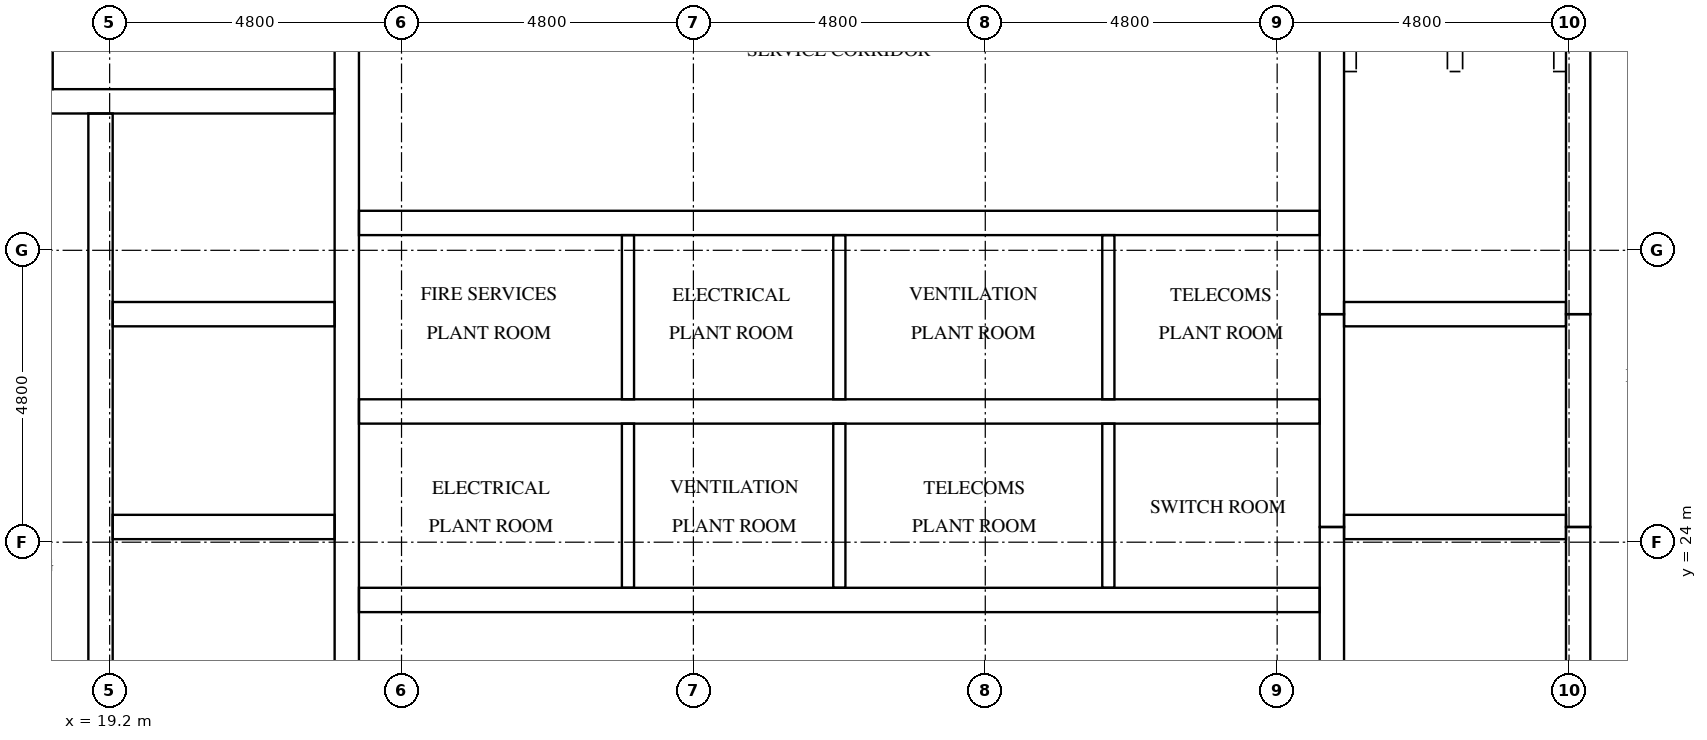
"""IFC4 building model, lengths in metres.
Left out: names, types, materials, properties, quantities, classifications, styles, units other than length and angle.
Written with IfcOpenShell. Run it as: python <this file> out.ifc"""

import sys

from ifc_helpers import new_model, si_unit, direction, frame, frame_2d, origin, place, context, subcontext, project, spatial, rectangle, extrude, element, fill, save


model = new_model("IFC4")
c1 = context("Model", 3, precision=1e-05, world=origin(), true_north=direction((0.0, 1.0)))
c2 = subcontext(c1, "Body", "Model", "MODEL_VIEW")
j1 = project(units=[si_unit("LENGTHUNIT", "METRE"), si_unit("PLANEANGLEUNIT", "RADIAN")], contexts=[c1])
p1 = place(None, origin())
s1 = spatial("IfcSite", under=j1, at=p1, CompositionType="ELEMENT")
p2 = place(p1, origin())
s2 = spatial("IfcBuilding", under=s1, at=p2, CompositionType="ELEMENT")
p3 = place(p2, frame((0.0, 0.0, 310.1)))
s3 = spatial("IfcBuildingStorey", under=s2, at=p3, CompositionType="ELEMENT", Elevation=310.1)
p4 = place(p3, frame((19.05, 15.5, 0.0), z_axis=(0.0, 0.0, 1.0), x_axis=(0.0, 1.0, 0.0)))
e1 = element("IfcWall", 1, at=p4, inside=s3, PredefinedType="SHEAR", context=c2, shape_type="SweptSolid", body=[
    extrude(rectangle(XDim=15.55, YDim=0.4, at=frame_2d((7.775, 0.0))), origin(), (0.0, 0.0, 1.0), 3.8),
])
p5 = place(p4, frame((9.95, 0.0, 0.0)))
e2 = element("IfcOpeningElement", 2, at=p5, cuts=e1, PredefinedType="OPENING", context=c2, shape_type="SweptSolid", body=[
    extrude(rectangle(XDim=1.1, YDim=2.1, at=frame_2d((0.55, 1.05))), frame((0.0, 0.21, 0.0), z_axis=(0.0, -1.0, 0.0), x_axis=(1.0, 0.0, 0.0)), (0.0, 0.0, 1.0), 0.42),
])
p6 = place(p4, frame((13.45, 0.0, 0.0)))
e3 = element("IfcOpeningElement", 3, at=p6, cuts=e1, PredefinedType="OPENING", context=c2, shape_type="SweptSolid", body=[
    extrude(rectangle(XDim=1.1, YDim=2.1, at=frame_2d((0.55, 1.05))), frame((0.0, 0.21, 0.0), z_axis=(0.0, -1.0, 0.0), x_axis=(1.0, 0.0, 0.0)), (0.0, 0.0, 1.0), 0.42),
])
p7 = place(p4, frame((0.7, 0.0, 0.0)))
e4 = element("IfcOpeningElement", 4, at=p7, cuts=e1, PredefinedType="OPENING", context=c2, shape_type="SweptSolid", body=[
    extrude(rectangle(XDim=1.2, YDim=2.1, at=frame_2d((0.6, 1.05))), frame((0.0, 0.21, 0.0), z_axis=(0.0, -1.0, 0.0), x_axis=(1.0, 0.0, 0.0)), (0.0, 0.0, 1.0), 0.42),
])
p8 = place(p3, frame((23.1, 15.5, 0.0), z_axis=(0.0, 0.0, 1.0), x_axis=(0.0, 1.0, 0.0)))
e5 = element("IfcWall", 5, at=p8, inside=s3, PredefinedType="SHEAR", context=c2, shape_type="SweptSolid", body=[
    extrude(rectangle(XDim=21.8, YDim=0.4, at=frame_2d((10.9, 0.0))), origin(), (0.0, 0.0, 1.0), 3.8),
])
p9 = place(p3, frame((39.3, 15.5, 0.0), z_axis=(0.0, 0.0, 1.0), x_axis=(0.0, 1.0, 0.0)))
e6 = element("IfcWall", 6, at=p9, inside=s3, PredefinedType="SHEAR", context=c2, shape_type="SweptSolid", body=[
    extrude(rectangle(XDim=8.75, YDim=0.4, at=frame_2d((4.375, 0.0))), origin(), (0.0, 0.0, 1.0), 3.8),
])
p10 = place(p3, frame((39.3, 24.25, 0.0), z_axis=(0.0, 0.0, 1.0), x_axis=(0.0, 1.0, 0.0)))
e7 = element("IfcWall", 7, at=p10, inside=s3, PredefinedType="SHEAR", context=c2, shape_type="SweptSolid", body=[
    extrude(rectangle(XDim=3.5, YDim=0.4, at=frame_2d((1.75, 0.0))), origin(), (0.0, 0.0, 1.0), 3.8),
])
p11 = place(p3, frame((39.3, 27.75, 0.0), z_axis=(0.0, 0.0, 1.0), x_axis=(0.0, 1.0, 0.0)))
e8 = element("IfcWall", 8, at=p11, inside=s3, PredefinedType="SHEAR", context=c2, shape_type="SweptSolid", body=[
    extrude(rectangle(XDim=9.55, YDim=0.4, at=frame_2d((4.775, 0.0))), origin(), (0.0, 0.0, 1.0), 3.8),
])
p12 = place(p3, frame((43.35, 15.5, 0.0), z_axis=(0.0, 0.0, 1.0), x_axis=(0.0, 1.0, 0.0)))
e9 = element("IfcWall", 9, at=p12, inside=s3, PredefinedType="SHEAR", context=c2, shape_type="SweptSolid", body=[
    extrude(rectangle(XDim=8.75, YDim=0.4, at=frame_2d((4.375, 0.0))), origin(), (0.0, 0.0, 1.0), 3.8),
])
p13 = place(p12, frame((0.7, 0.0, 0.0)))
e10 = element("IfcOpeningElement", 10, at=p13, cuts=e9, PredefinedType="OPENING", context=c2, shape_type="SweptSolid", body=[
    extrude(rectangle(XDim=1.2, YDim=2.1, at=frame_2d((0.6, 1.05))), frame((0.0, 0.21, 0.0), z_axis=(0.0, -1.0, 0.0), x_axis=(1.0, 0.0, 0.0)), (0.0, 0.0, 1.0), 0.42),
])
p14 = place(p3, frame((43.35, 24.25, 0.0), z_axis=(0.0, 0.0, 1.0), x_axis=(0.0, 1.0, 0.0)))
e11 = element("IfcWall", 11, at=p14, inside=s3, PredefinedType="SHEAR", context=c2, shape_type="SweptSolid", body=[
    extrude(rectangle(XDim=3.5, YDim=0.4, at=frame_2d((1.75, 0.0))), origin(), (0.0, 0.0, 1.0), 3.8),
])
p15 = place(p14, frame((1.2, 0.0, 0.0)))
e12 = element("IfcOpeningElement", 12, at=p15, cuts=e11, PredefinedType="OPENING", context=c2, shape_type="SweptSolid", body=[
    extrude(rectangle(XDim=1.1, YDim=2.1, at=frame_2d((0.55, 1.05))), frame((0.0, 0.21, 0.0), z_axis=(0.0, -1.0, 0.0), x_axis=(1.0, 0.0, 0.0)), (0.0, 0.0, 1.0), 0.42),
])
p16 = place(p3, frame((43.35, 27.75, 0.0), z_axis=(0.0, 0.0, 1.0), x_axis=(0.0, 1.0, 0.0)))
e13 = element("IfcWall", 13, at=p16, inside=s3, PredefinedType="SHEAR", context=c2, shape_type="SweptSolid", body=[
    extrude(rectangle(XDim=9.55, YDim=0.4, at=frame_2d((4.775, 0.0))), origin(), (0.0, 0.0, 1.0), 3.8),
])
p17 = place(p16, frame((7.65, 0.0, 0.0)))
e14 = element("IfcOpeningElement", 14, at=p17, cuts=e13, PredefinedType="OPENING", context=c2, shape_type="SweptSolid", body=[
    extrude(rectangle(XDim=1.2, YDim=2.1, at=frame_2d((0.6, 1.05))), frame((0.0, 0.21, 0.0), z_axis=(0.0, -1.0, 0.0), x_axis=(1.0, 0.0, 0.0)), (0.0, 0.0, 1.0), 0.42),
])
for number, where, z_axis, x_axis in (
    (15, (19.25, 24.25, 0.0), (0.0, 0.0, 1.0), (1.0, 0.0, 0.0)),
    (16, (19.25, 27.75, 0.0), (0.0, 0.0, 1.0), (1.0, 0.0, 0.0)),
):
    element("IfcWall", number, at=place(p3, frame(where, z_axis=z_axis, x_axis=x_axis)), inside=s3, PredefinedType="SHEAR", context=c2, shape_type="SweptSolid", body=[
        extrude(rectangle(XDim=3.65, YDim=0.4, at=frame_2d((1.825, 0.0))), origin(), (0.0, 0.0, 1.0), 3.8),
    ])
p18 = place(p3, frame((15.5, 31.25, 0.0), z_axis=(0.0, 0.0, 1.0), x_axis=(1.0, 0.0, 0.0)))
e17 = element("IfcWall", 17, at=p18, inside=s3, PredefinedType="SHEAR", context=c2, shape_type="SweptSolid", body=[
    extrude(rectangle(XDim=7.4, YDim=0.4, at=frame_2d((3.7, 0.0))), origin(), (0.0, 0.0, 1.0), 3.8),
])
for number, where, z_axis, x_axis in (
    (18, (39.5, 24.25, 0.0), (0.0, 0.0, 1.0), (1.0, 0.0, 0.0)),
    (19, (39.5, 27.75, 0.0), (0.0, 0.0, 1.0), (1.0, 0.0, 0.0)),
):
    element("IfcWall", number, at=place(p3, frame(where, z_axis=z_axis, x_axis=x_axis)), inside=s3, PredefinedType="SHEAR", context=c2, shape_type="SweptSolid", body=[
        extrude(rectangle(XDim=3.65, YDim=0.4, at=frame_2d((1.825, 0.0))), origin(), (0.0, 0.0, 1.0), 3.8),
    ])
p19 = place(p3, frame((23.3, 23.05, 0.0), z_axis=(0.0, 0.0, 1.0), x_axis=(1.0, 0.0, 0.0)))
e20 = element("IfcWall", 20, at=p19, inside=s3, PredefinedType="SHEAR", context=c2, shape_type="SweptSolid", body=[
    extrude(rectangle(XDim=15.8, YDim=0.4, at=frame_2d((7.9, 0.0))), origin(), (0.0, 0.0, 1.0), 3.8),
])
p20 = place(p19, frame((1.662, 0.0, 0.0)))
e21 = element("IfcOpeningElement", 21, at=p20, cuts=e20, PredefinedType="OPENING", context=c2, shape_type="SweptSolid", body=[
    extrude(rectangle(XDim=1.0, YDim=2.1, at=frame_2d((0.5, 1.05))), frame((0.0, 0.21, 0.0), z_axis=(0.0, -1.0, 0.0), x_axis=(1.0, 0.0, 0.0)), (0.0, 0.0, 1.0), 0.42),
])
p21 = place(p19, frame((5.662, 0.0, 0.0)))
e22 = element("IfcOpeningElement", 22, at=p21, cuts=e20, PredefinedType="OPENING", context=c2, shape_type="SweptSolid", body=[
    extrude(rectangle(XDim=1.0, YDim=2.1, at=frame_2d((0.5, 1.05))), frame((0.0, 0.21, 0.0), z_axis=(0.0, -1.0, 0.0), x_axis=(1.0, 0.0, 0.0)), (0.0, 0.0, 1.0), 0.42),
])
p22 = place(p19, frame((9.612, 0.0, 0.0)))
e23 = element("IfcOpeningElement", 23, at=p22, cuts=e20, PredefinedType="OPENING", context=c2, shape_type="SweptSolid", body=[
    extrude(rectangle(XDim=1.0, YDim=2.1, at=frame_2d((0.5, 1.05))), frame((0.0, 0.21, 0.0), z_axis=(0.0, -1.0, 0.0), x_axis=(1.0, 0.0, 0.0)), (0.0, 0.0, 1.0), 0.42),
])
p23 = place(p19, frame((13.612, 0.0, 0.0)))
e24 = element("IfcOpeningElement", 24, at=p23, cuts=e20, PredefinedType="OPENING", context=c2, shape_type="SweptSolid", body=[
    extrude(rectangle(XDim=1.0, YDim=2.1, at=frame_2d((0.5, 1.05))), frame((0.0, 0.21, 0.0), z_axis=(0.0, -1.0, 0.0), x_axis=(1.0, 0.0, 0.0)), (0.0, 0.0, 1.0), 0.42),
])
p24 = place(p3, frame((23.3, 26.15, 0.0), z_axis=(0.0, 0.0, 1.0), x_axis=(1.0, 0.0, 0.0)))
e25 = element("IfcWall", 25, at=p24, inside=s3, PredefinedType="SHEAR", context=c2, shape_type="SweptSolid", body=[
    extrude(rectangle(XDim=15.8, YDim=0.4, at=frame_2d((7.9, 0.0))), origin(), (0.0, 0.0, 1.0), 3.8),
])
p25 = place(p3, frame((23.3, 29.25, 0.0), z_axis=(0.0, 0.0, 1.0), x_axis=(1.0, 0.0, 0.0)))
e26 = element("IfcWall", 26, at=p25, inside=s3, PredefinedType="SHEAR", context=c2, shape_type="SweptSolid", body=[
    extrude(rectangle(XDim=15.8, YDim=0.4, at=frame_2d((7.9, 0.0))), origin(), (0.0, 0.0, 1.0), 3.8),
])
p26 = place(p25, frame((1.662, 0.0, 0.0)))
e27 = element("IfcOpeningElement", 27, at=p26, cuts=e26, PredefinedType="OPENING", context=c2, shape_type="SweptSolid", body=[
    extrude(rectangle(XDim=1.0, YDim=2.1, at=frame_2d((0.5, 1.05))), frame((0.0, 0.21, 0.0), z_axis=(0.0, -1.0, 0.0), x_axis=(1.0, 0.0, 0.0)), (0.0, 0.0, 1.0), 0.42),
])
p27 = place(p25, frame((5.662, 0.0, 0.0)))
e28 = element("IfcOpeningElement", 28, at=p27, cuts=e26, PredefinedType="OPENING", context=c2, shape_type="SweptSolid", body=[
    extrude(rectangle(XDim=1.0, YDim=2.1, at=frame_2d((0.5, 1.05))), frame((0.0, 0.21, 0.0), z_axis=(0.0, -1.0, 0.0), x_axis=(1.0, 0.0, 0.0)), (0.0, 0.0, 1.0), 0.42),
])
p28 = place(p25, frame((9.612, 0.0, 0.0)))
e29 = element("IfcOpeningElement", 29, at=p28, cuts=e26, PredefinedType="OPENING", context=c2, shape_type="SweptSolid", body=[
    extrude(rectangle(XDim=1.0, YDim=2.1, at=frame_2d((0.5, 1.05))), frame((0.0, 0.21, 0.0), z_axis=(0.0, -1.0, 0.0), x_axis=(1.0, 0.0, 0.0)), (0.0, 0.0, 1.0), 0.42),
])
p29 = place(p25, frame((13.612, 0.0, 0.0)))
e30 = element("IfcOpeningElement", 30, at=p29, cuts=e26, PredefinedType="OPENING", context=c2, shape_type="SweptSolid", body=[
    extrude(rectangle(XDim=1.0, YDim=2.1, at=frame_2d((0.5, 1.05))), frame((0.0, 0.21, 0.0), z_axis=(0.0, -1.0, 0.0), x_axis=(1.0, 0.0, 0.0)), (0.0, 0.0, 1.0), 0.42),
])
p30 = place(p3, frame((18.164, 31.45, 0.0), z_axis=(0.0, 0.0, 1.0), x_axis=(0.0, 1.0, 0.0)))
e31 = element("IfcWall", 31, at=p30, inside=s3, PredefinedType="PARTITIONING", context=c2, shape_type="SweptSolid", body=[
    extrude(rectangle(XDim=5.85, YDim=0.2, at=frame_2d((2.925, 0.0))), origin(), (0.0, 0.0, 1.0), 3.8),
])
for number, where, z_axis, x_axis in (
    (32, (27.724, 23.25, 0.0), (0.0, 0.0, 1.0), (0.0, 1.0, 0.0)),
    (33, (31.2, 23.25, 0.0), (0.0, 0.0, 1.0), (0.0, 1.0, 0.0)),
    (34, (35.624, 23.25, 0.0), (0.0, 0.0, 1.0), (0.0, 1.0, 0.0)),
    (35, (27.724, 26.35, 0.0), (0.0, 0.0, 1.0), (0.0, 1.0, 0.0)),
    (36, (31.2, 26.35, 0.0), (0.0, 0.0, 1.0), (0.0, 1.0, 0.0)),
    (37, (35.624, 26.35, 0.0), (0.0, 0.0, 1.0), (0.0, 1.0, 0.0)),
):
    element("IfcWall", number, at=place(p3, frame(where, z_axis=z_axis, x_axis=x_axis)), inside=s3, PredefinedType="PARTITIONING", context=c2, shape_type="SweptSolid", body=[
        extrude(rectangle(XDim=2.7, YDim=0.2, at=frame_2d((1.35, 0.0))), origin(), (0.0, 0.0, 1.0), 3.8),
    ])
p31 = place(p5, origin())
e38 = element("IfcDoor", 38, at=p31, inside=s3, OperationType="DOUBLE_DOOR_SLIDING", PredefinedType="DOOR", context=c2, shape_type="SweptSolid", body=[
    extrude(rectangle(XDim=1.1, YDim=2.1, at=frame_2d((0.55, 1.05))), frame((0.0, 0.025, 0.0), z_axis=(0.0, -1.0, 0.0), x_axis=(1.0, 0.0, 0.0)), (0.0, 0.0, 1.0), 0.05),
])
fill(e2, e38)
p32 = place(p6, origin())
e39 = element("IfcDoor", 39, at=p32, inside=s3, OperationType="DOUBLE_DOOR_SLIDING", PredefinedType="DOOR", context=c2, shape_type="SweptSolid", body=[
    extrude(rectangle(XDim=1.1, YDim=2.1, at=frame_2d((0.55, 1.05))), frame((0.0, 0.025, 0.0), z_axis=(0.0, -1.0, 0.0), x_axis=(1.0, 0.0, 0.0)), (0.0, 0.0, 1.0), 0.05),
])
fill(e3, e39)
p33 = place(p15, origin())
e40 = element("IfcDoor", 40, at=p33, inside=s3, OperationType="DOUBLE_DOOR_SLIDING", PredefinedType="DOOR", context=c2, shape_type="SweptSolid", body=[
    extrude(rectangle(XDim=1.1, YDim=2.1, at=frame_2d((0.55, 1.05))), frame((0.0, 0.025, 0.0), z_axis=(0.0, -1.0, 0.0), x_axis=(1.0, 0.0, 0.0)), (0.0, 0.0, 1.0), 0.05),
])
fill(e12, e40)
p34 = place(p20, frame((1.0, 0.0, 0.0), z_axis=(0.0, 0.0, 1.0), x_axis=(-1.0, 0.0, 0.0)))
e41 = element("IfcDoor", 41, at=p34, inside=s3, OperationType="SINGLE_SWING_LEFT", PredefinedType="DOOR", context=c2, shape_type="SweptSolid", body=[
    extrude(rectangle(XDim=1.0, YDim=2.1, at=frame_2d((0.5, 1.05))), frame((0.0, 0.025, 0.0), z_axis=(0.0, -1.0, 0.0), x_axis=(1.0, 0.0, 0.0)), (0.0, 0.0, 1.0), 0.05),
])
fill(e21, e41)
p35 = place(p21, frame((1.0, 0.0, 0.0), z_axis=(0.0, 0.0, 1.0), x_axis=(-1.0, 0.0, 0.0)))
e42 = element("IfcDoor", 42, at=p35, inside=s3, OperationType="SINGLE_SWING_RIGHT", PredefinedType="DOOR", context=c2, shape_type="SweptSolid", body=[
    extrude(rectangle(XDim=1.0, YDim=2.1, at=frame_2d((0.5, 1.05))), frame((0.0, 0.025, 0.0), z_axis=(0.0, -1.0, 0.0), x_axis=(1.0, 0.0, 0.0)), (0.0, 0.0, 1.0), 0.05),
])
fill(e22, e42)
p36 = place(p22, frame((1.0, 0.0, 0.0), z_axis=(0.0, 0.0, 1.0), x_axis=(-1.0, 0.0, 0.0)))
e43 = element("IfcDoor", 43, at=p36, inside=s3, OperationType="SINGLE_SWING_LEFT", PredefinedType="DOOR", context=c2, shape_type="SweptSolid", body=[
    extrude(rectangle(XDim=1.0, YDim=2.1, at=frame_2d((0.5, 1.05))), frame((0.0, 0.025, 0.0), z_axis=(0.0, -1.0, 0.0), x_axis=(1.0, 0.0, 0.0)), (0.0, 0.0, 1.0), 0.05),
])
fill(e23, e43)
p37 = place(p23, frame((1.0, 0.0, 0.0), z_axis=(0.0, 0.0, 1.0), x_axis=(-1.0, 0.0, 0.0)))
e44 = element("IfcDoor", 44, at=p37, inside=s3, OperationType="SINGLE_SWING_RIGHT", PredefinedType="DOOR", context=c2, shape_type="SweptSolid", body=[
    extrude(rectangle(XDim=1.0, YDim=2.1, at=frame_2d((0.5, 1.05))), frame((0.0, 0.025, 0.0), z_axis=(0.0, -1.0, 0.0), x_axis=(1.0, 0.0, 0.0)), (0.0, 0.0, 1.0), 0.05),
])
fill(e24, e44)
p38 = place(p26, origin())
e45 = element("IfcDoor", 45, at=p38, inside=s3, OperationType="SINGLE_SWING_LEFT", PredefinedType="DOOR", context=c2, shape_type="SweptSolid", body=[
    extrude(rectangle(XDim=1.0, YDim=2.1, at=frame_2d((0.5, 1.05))), frame((0.0, 0.025, 0.0), z_axis=(0.0, -1.0, 0.0), x_axis=(1.0, 0.0, 0.0)), (0.0, 0.0, 1.0), 0.05),
])
fill(e27, e45)
p39 = place(p27, origin())
e46 = element("IfcDoor", 46, at=p39, inside=s3, OperationType="SINGLE_SWING_RIGHT", PredefinedType="DOOR", context=c2, shape_type="SweptSolid", body=[
    extrude(rectangle(XDim=1.0, YDim=2.1, at=frame_2d((0.5, 1.05))), frame((0.0, 0.025, 0.0), z_axis=(0.0, -1.0, 0.0), x_axis=(1.0, 0.0, 0.0)), (0.0, 0.0, 1.0), 0.05),
])
fill(e28, e46)
p40 = place(p28, origin())
e47 = element("IfcDoor", 47, at=p40, inside=s3, OperationType="SINGLE_SWING_LEFT", PredefinedType="DOOR", context=c2, shape_type="SweptSolid", body=[
    extrude(rectangle(XDim=1.0, YDim=2.1, at=frame_2d((0.5, 1.05))), frame((0.0, 0.025, 0.0), z_axis=(0.0, -1.0, 0.0), x_axis=(1.0, 0.0, 0.0)), (0.0, 0.0, 1.0), 0.05),
])
fill(e29, e47)
p41 = place(p29, origin())
e48 = element("IfcDoor", 48, at=p41, inside=s3, OperationType="SINGLE_SWING_RIGHT", PredefinedType="DOOR", context=c2, shape_type="SweptSolid", body=[
    extrude(rectangle(XDim=1.0, YDim=2.1, at=frame_2d((0.5, 1.05))), frame((0.0, 0.025, 0.0), z_axis=(0.0, -1.0, 0.0), x_axis=(1.0, 0.0, 0.0)), (0.0, 0.0, 1.0), 0.05),
])
fill(e30, e48)
save(model, sys.argv[1])
